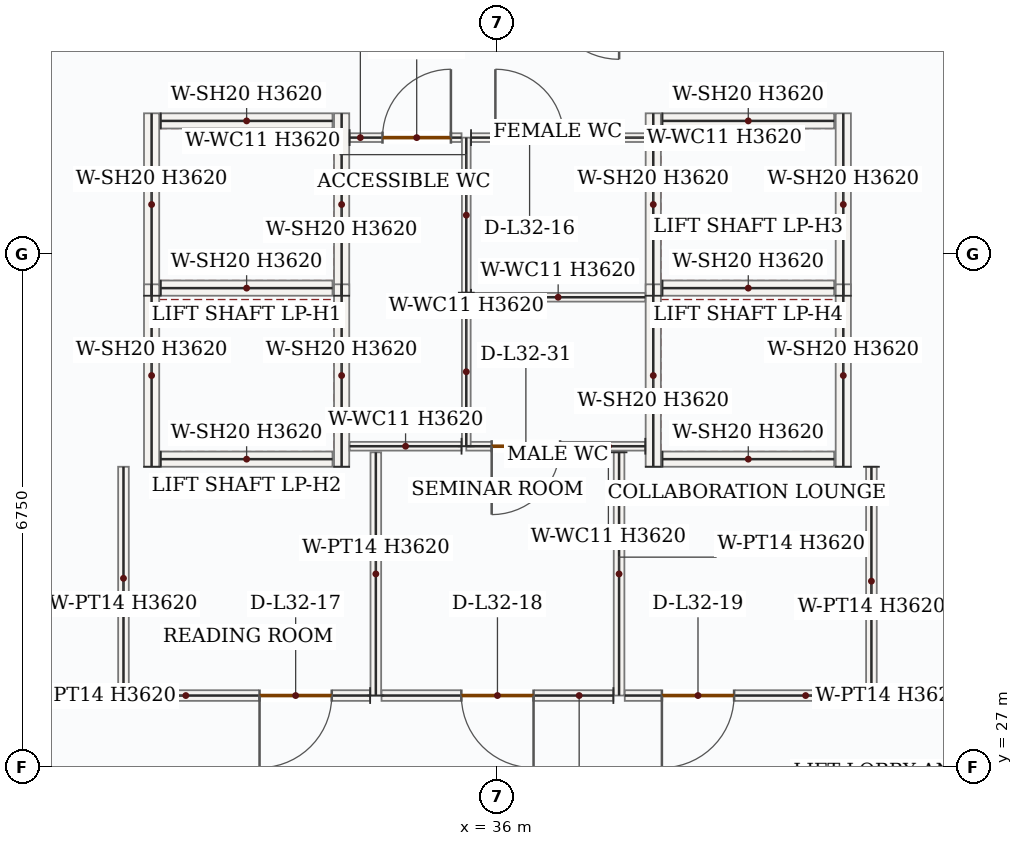
"""IFC4 building model, lengths in metres.
Left out: names, types, materials, properties, quantities, classifications, styles, units other than length and angle.
Written with IfcOpenShell. Run it as: python <this file> out.ifc"""

import sys

from ifc_helpers import new_model, si_unit, direction, frame, frame_2d, origin, place, context, subcontext, project, spatial, rectangle, extrude, source, transform, mapped, element, fill, save


model = new_model("IFC4")
c1 = context("Model", 3, precision=1e-05, world=origin(), true_north=direction((0.0, 1.0)))
c2 = subcontext(c1, "Body", "Model", "MODEL_VIEW")
j1 = project(units=[si_unit("LENGTHUNIT", "METRE"), si_unit("PLANEANGLEUNIT", "RADIAN")], contexts=[c1])
p1 = place(None, origin())
s1 = spatial("IfcSite", under=j1, at=p1, CompositionType="ELEMENT")
p2 = place(p1, origin())
s2 = spatial("IfcBuilding", under=s1, at=p2, CompositionType="ELEMENT")
p3 = place(p2, frame((0.0, 0.0, 143.4)))
s3 = spatial("IfcBuildingStorey", under=s2, at=p3, CompositionType="ELEMENT", Elevation=143.4)
m1 = source(origin(), c2, "Body", "SweptSolid", [
    extrude(rectangle(XDim=2.4, YDim=0.2, at=frame_2d((1.2, 0.0))), origin(), (0.0, 0.0, 1.0), 3.62),
])
for number, where, z_axis, x_axis in (
    (1, (31.45, 33.2, 0.0), (0.0, 0.0, 1.0), (0.0, 1.0, 0.0)),
    (2, (33.95, 33.2, 0.0), (0.0, 0.0, 1.0), (0.0, 1.0, 0.0)),
):
    element("IfcWall", number, at=place(p3, frame(where, z_axis=z_axis, x_axis=x_axis)), inside=s3, PredefinedType="SOLIDWALL", context=c2, shape_type="MappedRepresentation", body=[
        mapped(m1, transform((0.0, 0.0, 0.0), x_axis=(1.0, 0.0, 0.0), y_axis=(0.0, 1.0, 0.0), z_axis=(0.0, 0.0, 1.0), scale=1.0)),
    ])
m2 = source(origin(), c2, "Body", "SweptSolid", [
    extrude(rectangle(XDim=2.26, YDim=0.2, at=frame_2d((1.13, 0.0))), origin(), (0.0, 0.0, 1.0), 3.62),
])
for number, where, z_axis, x_axis in (
    (3, (31.57, 33.3, 0.0), (0.0, 0.0, 1.0), (1.0, 0.0, 0.0)),
    (4, (31.57, 35.5, 0.0), (0.0, 0.0, 1.0), (1.0, 0.0, 0.0)),
):
    element("IfcWall", number, at=place(p3, frame(where, z_axis=z_axis, x_axis=x_axis)), inside=s3, PredefinedType="SOLIDWALL", context=c2, shape_type="MappedRepresentation", body=[
        mapped(m2, transform((0.0, 0.0, 0.0), x_axis=(1.0, 0.0, 0.0), y_axis=(0.0, 1.0, 0.0), z_axis=(0.0, 0.0, 1.0), scale=1.0)),
    ])
for number, where, z_axis, x_axis in (
    (5, (31.45, 30.95, 0.0), (0.0, 0.0, 1.0), (0.0, 1.0, 0.0)),
    (6, (33.95, 30.95, 0.0), (0.0, 0.0, 1.0), (0.0, 1.0, 0.0)),
):
    element("IfcWall", number, at=place(p3, frame(where, z_axis=z_axis, x_axis=x_axis)), inside=s3, PredefinedType="SOLIDWALL", context=c2, shape_type="MappedRepresentation", body=[
        mapped(m1, transform((0.0, 0.0, 0.0), x_axis=(1.0, 0.0, 0.0), y_axis=(0.0, 1.0, 0.0), z_axis=(0.0, 0.0, 1.0), scale=1.0)),
    ])
p4 = place(p3, frame((31.57, 31.05, 0.0), z_axis=(0.0, 0.0, 1.0), x_axis=(1.0, 0.0, 0.0)))
e7 = element("IfcWall", 7, at=p4, inside=s3, PredefinedType="SOLIDWALL", context=c2, shape_type="MappedRepresentation", body=[
    mapped(m2, transform((0.0, 0.0, 0.0), x_axis=(1.0, 0.0, 0.0), y_axis=(0.0, 1.0, 0.0), z_axis=(0.0, 0.0, 1.0), scale=1.0)),
])
for number, where, z_axis, x_axis in (
    (8, (38.05, 33.2, 0.0), (0.0, 0.0, 1.0), (0.0, 1.0, 0.0)),
    (9, (40.55, 33.2, 0.0), (0.0, 0.0, 1.0), (0.0, 1.0, 0.0)),
):
    element("IfcWall", number, at=place(p3, frame(where, z_axis=z_axis, x_axis=x_axis)), inside=s3, PredefinedType="SOLIDWALL", context=c2, shape_type="MappedRepresentation", body=[
        mapped(m1, transform((0.0, 0.0, 0.0), x_axis=(1.0, 0.0, 0.0), y_axis=(0.0, 1.0, 0.0), z_axis=(0.0, 0.0, 1.0), scale=1.0)),
    ])
for number, where, z_axis, x_axis in (
    (10, (38.17, 33.3, 0.0), (0.0, 0.0, 1.0), (1.0, 0.0, 0.0)),
    (11, (38.17, 35.5, 0.0), (0.0, 0.0, 1.0), (1.0, 0.0, 0.0)),
):
    element("IfcWall", number, at=place(p3, frame(where, z_axis=z_axis, x_axis=x_axis)), inside=s3, PredefinedType="SOLIDWALL", context=c2, shape_type="MappedRepresentation", body=[
        mapped(m2, transform((0.0, 0.0, 0.0), x_axis=(1.0, 0.0, 0.0), y_axis=(0.0, 1.0, 0.0), z_axis=(0.0, 0.0, 1.0), scale=1.0)),
    ])
for number, where, z_axis, x_axis in (
    (12, (38.05, 30.95, 0.0), (0.0, 0.0, 1.0), (0.0, 1.0, 0.0)),
    (13, (40.55, 30.95, 0.0), (0.0, 0.0, 1.0), (0.0, 1.0, 0.0)),
):
    element("IfcWall", number, at=place(p3, frame(where, z_axis=z_axis, x_axis=x_axis)), inside=s3, PredefinedType="SOLIDWALL", context=c2, shape_type="MappedRepresentation", body=[
        mapped(m1, transform((0.0, 0.0, 0.0), x_axis=(1.0, 0.0, 0.0), y_axis=(0.0, 1.0, 0.0), z_axis=(0.0, 0.0, 1.0), scale=1.0)),
    ])
p5 = place(p3, frame((38.17, 31.05, 0.0), z_axis=(0.0, 0.0, 1.0), x_axis=(1.0, 0.0, 0.0)))
e14 = element("IfcWall", 14, at=p5, inside=s3, PredefinedType="SOLIDWALL", context=c2, shape_type="MappedRepresentation", body=[
    mapped(m2, transform((0.0, 0.0, 0.0), x_axis=(1.0, 0.0, 0.0), y_axis=(0.0, 1.0, 0.0), z_axis=(0.0, 0.0, 1.0), scale=1.0)),
])
p6 = place(p3, frame((37.945, 31.22, 0.0), z_axis=(0.0, 0.0, 1.0), x_axis=(-1.0, 0.0, 0.0)))
e15 = element("IfcWall", 15, at=p6, inside=s3, PredefinedType="PARTITIONING", context=c2, shape_type="SweptSolid", body=[
    extrude(rectangle(XDim=2.355, YDim=0.115, at=frame_2d((1.177, 0.0))), origin(), (0.0, 0.0, 1.0), 3.62),
])
p7 = place(p6, frame((1.121, 0.0, 0.0)))
e16 = element("IfcOpeningElement", 16, at=p7, cuts=e15, PredefinedType="OPENING", context=c2, shape_type="SweptSolid", body=[
    extrude(rectangle(XDim=0.9, YDim=2.1, at=frame_2d((0.45, 1.05))), frame((0.0, 0.067, 0.0), z_axis=(0.0, -1.0, 0.0), x_axis=(1.0, 0.0, 0.0)), (0.0, 0.0, 1.0), 0.135),
])
m3 = source(origin(), c2, "Body", "SweptSolid", [
    extrude(rectangle(XDim=1.96, YDim=0.115, at=frame_2d((0.98, 0.0))), origin(), (0.0, 0.0, 1.0), 3.62),
])
p8 = place(p3, frame((35.59, 31.22, 0.0), z_axis=(0.0, 0.0, 1.0), x_axis=(0.0, 1.0, 0.0)))
e17 = element("IfcWall", 17, at=p8, inside=s3, PredefinedType="PARTITIONING", context=c2, shape_type="MappedRepresentation", body=[
    mapped(m3, transform((0.0, 0.0, 0.0), x_axis=(1.0, 0.0, 0.0), y_axis=(0.0, 1.0, 0.0), z_axis=(0.0, 0.0, 1.0), scale=1.0)),
])
m4 = source(origin(), c2, "Body", "SweptSolid", [
    extrude(rectangle(XDim=2.292, YDim=0.115, at=frame_2d((1.146, 0.0))), origin(), (0.0, 0.0, 1.0), 3.62),
])
p9 = place(p3, frame((35.653, 33.18, 0.0), z_axis=(0.0, 0.0, 1.0), x_axis=(1.0, 0.0, 0.0)))
e18 = element("IfcWall", 18, at=p9, inside=s3, PredefinedType="PARTITIONING", context=c2, shape_type="MappedRepresentation", body=[
    mapped(m4, transform((0.0, 0.0, 0.0), x_axis=(1.0, 0.0, 0.0), y_axis=(0.0, 1.0, 0.0), z_axis=(0.0, 0.0, 1.0), scale=1.0)),
])
m5 = source(origin(), c2, "Body", "SweptSolid", [
    extrude(rectangle(XDim=2.04, YDim=0.115, at=frame_2d((1.02, 0.0))), origin(), (0.0, 0.0, 1.0), 3.62),
])
p10 = place(p3, frame((35.59, 33.24, 0.0), z_axis=(0.0, 0.0, 1.0), x_axis=(0.0, 1.0, 0.0)))
e19 = element("IfcWall", 19, at=p10, inside=s3, PredefinedType="PARTITIONING", context=c2, shape_type="MappedRepresentation", body=[
    mapped(m5, transform((0.0, 0.0, 0.0), x_axis=(1.0, 0.0, 0.0), y_axis=(0.0, 1.0, 0.0), z_axis=(0.0, 0.0, 1.0), scale=1.0)),
])
p11 = place(p3, frame((35.653, 35.28, 0.0), z_axis=(0.0, 0.0, 1.0), x_axis=(1.0, 0.0, 0.0)))
e20 = element("IfcWall", 20, at=p11, inside=s3, PredefinedType="PARTITIONING", context=c2, shape_type="SweptSolid", body=[
    extrude(rectangle(XDim=2.292, YDim=0.115, at=frame_2d((1.146, 0.0))), origin(), (0.0, 0.0, 1.0), 3.62),
])
p12 = place(p11, frame((0.32, 0.0, 0.0)))
e21 = element("IfcOpeningElement", 21, at=p12, cuts=e20, PredefinedType="OPENING", context=c2, shape_type="SweptSolid", body=[
    extrude(rectangle(XDim=0.9, YDim=2.1, at=frame_2d((0.45, 1.05))), frame((0.0, 0.067, 0.0), z_axis=(0.0, -1.0, 0.0), x_axis=(1.0, 0.0, 0.0)), (0.0, 0.0, 1.0), 0.135),
])
m6 = source(origin(), c2, "Body", "SweptSolid", [
    extrude(rectangle(XDim=1.473, YDim=0.115, at=frame_2d((0.736, 0.0))), origin(), (0.0, 0.0, 1.0), 3.62),
])
p13 = place(p3, frame((35.528, 31.22, 0.0), z_axis=(0.0, 0.0, 1.0), x_axis=(-1.0, 0.0, 0.0)))
e22 = element("IfcWall", 22, at=p13, inside=s3, PredefinedType="PARTITIONING", context=c2, shape_type="MappedRepresentation", body=[
    mapped(m6, transform((0.0, 0.0, 0.0), x_axis=(1.0, 0.0, 0.0), y_axis=(0.0, 1.0, 0.0), z_axis=(0.0, 0.0, 1.0), scale=1.0)),
])
p14 = place(p3, frame((34.055, 35.28, 0.0), z_axis=(0.0, 0.0, 1.0), x_axis=(1.0, 0.0, 0.0)))
e23 = element("IfcWall", 23, at=p14, inside=s3, PredefinedType="PARTITIONING", context=c2, shape_type="SweptSolid", body=[
    extrude(rectangle(XDim=1.473, YDim=0.115, at=frame_2d((0.736, 0.0))), origin(), (0.0, 0.0, 1.0), 3.62),
])
p15 = place(p14, frame((0.433, 0.0, 0.0)))
e24 = element("IfcOpeningElement", 24, at=p15, cuts=e23, PredefinedType="OPENING", context=c2, shape_type="SweptSolid", body=[
    extrude(rectangle(XDim=0.9, YDim=2.1, at=frame_2d((0.45, 1.05))), frame((0.0, 0.067, 0.0), z_axis=(0.0, -1.0, 0.0), x_axis=(1.0, 0.0, 0.0)), (0.0, 0.0, 1.0), 0.135),
])
m7 = source(origin(), c2, "Body", "SweptSolid", [
    extrude(rectangle(XDim=3.2, YDim=0.14, at=frame_2d((1.6, 0.0))), origin(), (0.0, 0.0, 1.0), 3.62),
])
for number, where, z_axis, x_axis in (
    (25, (34.4, 27.94, 0.0), (0.0, 0.0, 1.0), (0.0, 1.0, 0.0)),
    (26, (37.6, 31.14, 0.0), (0.0, 0.0, 1.0), (0.0, -1.0, 0.0)),
):
    element("IfcWall", number, at=place(p3, frame(where, z_axis=z_axis, x_axis=x_axis)), inside=s3, PredefinedType="PARTITIONING", context=c2, shape_type="MappedRepresentation", body=[
        mapped(m7, transform((0.0, 0.0, 0.0), x_axis=(1.0, 0.0, 0.0), y_axis=(0.0, 1.0, 0.0), z_axis=(0.0, 0.0, 1.0), scale=1.0)),
    ])
p16 = place(p3, frame((37.525, 27.94, 0.0), z_axis=(0.0, 0.0, 1.0), x_axis=(-1.0, 0.0, 0.0)))
e27 = element("IfcWall", 27, at=p16, inside=s3, PredefinedType="PARTITIONING", context=c2, shape_type="SweptSolid", body=[
    extrude(rectangle(XDim=3.05, YDim=0.14, at=frame_2d((1.525, 0.0))), origin(), (0.0, 0.0, 1.0), 3.62),
])
p17 = place(p16, frame((1.05, 0.0, 0.0)))
e28 = element("IfcOpeningElement", 28, at=p17, cuts=e27, PredefinedType="OPENING", context=c2, shape_type="SweptSolid", body=[
    extrude(rectangle(XDim=0.95, YDim=2.15, at=frame_2d((0.475, 1.075))), frame((0.0, 0.08, 0.0), z_axis=(0.0, -1.0, 0.0), x_axis=(1.0, 0.0, 0.0)), (0.0, 0.0, 1.0), 0.16),
])
p18 = place(p3, frame((34.325, 27.94, 0.0), z_axis=(0.0, 0.0, 1.0), x_axis=(-1.0, 0.0, 0.0)))
e29 = element("IfcWall", 29, at=p18, inside=s3, PredefinedType="PARTITIONING", context=c2, shape_type="SweptSolid", body=[
    extrude(rectangle(XDim=3.245, YDim=0.14, at=frame_2d((1.623, 0.0))), origin(), (0.0, 0.0, 1.0), 3.62),
])
p19 = place(p18, frame((0.505, 0.0, 0.0)))
e30 = element("IfcOpeningElement", 30, at=p19, cuts=e29, PredefinedType="OPENING", context=c2, shape_type="SweptSolid", body=[
    extrude(rectangle(XDim=0.95, YDim=2.15, at=frame_2d((0.475, 1.075))), frame((0.0, 0.08, 0.0), z_axis=(0.0, -1.0, 0.0), x_axis=(1.0, 0.0, 0.0)), (0.0, 0.0, 1.0), 0.16),
])
m8 = source(origin(), c2, "Body", "SweptSolid", [
    extrude(rectangle(XDim=2.935, YDim=0.14, at=frame_2d((1.468, 0.0))), origin(), (0.0, 0.0, 1.0), 3.62),
])
p20 = place(p3, frame((31.08, 28.015, 0.0), z_axis=(0.0, 0.0, 1.0), x_axis=(0.0, 1.0, 0.0)))
e31 = element("IfcWall", 31, at=p20, inside=s3, PredefinedType="PARTITIONING", context=c2, shape_type="MappedRepresentation", body=[
    mapped(m8, transform((0.0, 0.0, 0.0), x_axis=(1.0, 0.0, 0.0), y_axis=(0.0, 1.0, 0.0), z_axis=(0.0, 0.0, 1.0), scale=1.0)),
])
m9 = source(origin(), c2, "Body", "SweptSolid", [
    extrude(rectangle(XDim=3.01, YDim=0.14, at=frame_2d((1.505, 0.0))), origin(), (0.0, 0.0, 1.0), 3.62),
])
p21 = place(p3, frame((40.92, 30.95, 0.0), z_axis=(0.0, 0.0, 1.0), x_axis=(0.0, -1.0, 0.0)))
e32 = element("IfcWall", 32, at=p21, inside=s3, PredefinedType="PARTITIONING", context=c2, shape_type="MappedRepresentation", body=[
    mapped(m9, transform((0.0, 0.0, 0.0), x_axis=(1.0, 0.0, 0.0), y_axis=(0.0, 1.0, 0.0), z_axis=(0.0, 0.0, 1.0), scale=1.0)),
])
p22 = place(p3, frame((40.845, 27.94, 0.0), z_axis=(0.0, 0.0, 1.0), x_axis=(-1.0, 0.0, 0.0)))
e33 = element("IfcWall", 33, at=p22, inside=s3, PredefinedType="PARTITIONING", context=c2, shape_type="SweptSolid", body=[
    extrude(rectangle(XDim=3.17, YDim=0.14, at=frame_2d((1.585, 0.0))), origin(), (0.0, 0.0, 1.0), 3.62),
])
p23 = place(p22, frame((1.732, 0.0, 0.0)))
e34 = element("IfcOpeningElement", 34, at=p23, cuts=e33, PredefinedType="OPENING", context=c2, shape_type="SweptSolid", body=[
    extrude(rectangle(XDim=0.95, YDim=2.15, at=frame_2d((0.475, 1.075))), frame((0.0, 0.08, 0.0), z_axis=(0.0, -1.0, 0.0), x_axis=(1.0, 0.0, 0.0)), (0.0, 0.0, 1.0), 0.16),
])
m10 = source(origin(), c2, "Body", "SweptSolid", [
    extrude(rectangle(XDim=0.9, YDim=2.1, at=frame_2d((0.45, 1.05))), frame((0.0, 0.025, 0.0), z_axis=(0.0, -1.0, 0.0), x_axis=(1.0, 0.0, 0.0)), (0.0, 0.0, 1.0), 0.05),
])
p24 = place(p15, origin())
e35 = element("IfcDoor", 35, at=p24, inside=s3, OperationType="SINGLE_SWING_RIGHT", PredefinedType="DOOR", context=c2, shape_type="MappedRepresentation", body=[
    mapped(m10, transform((0.0, 0.0, 0.0), x_axis=(1.0, 0.0, 0.0), y_axis=(0.0, 1.0, 0.0), z_axis=(0.0, 0.0, 1.0), scale=1.0)),
])
fill(e24, e35)
p25 = place(p12, origin())
e36 = element("IfcDoor", 36, at=p25, inside=s3, OperationType="SINGLE_SWING_LEFT", PredefinedType="DOOR", context=c2, shape_type="MappedRepresentation", body=[
    mapped(m10, transform((0.0, 0.0, 0.0), x_axis=(1.0, 0.0, 0.0), y_axis=(0.0, 1.0, 0.0), z_axis=(0.0, 0.0, 1.0), scale=1.0)),
])
fill(e21, e36)
m11 = source(origin(), c2, "Body", "SweptSolid", [
    extrude(rectangle(XDim=0.95, YDim=2.15, at=frame_2d((0.475, 1.075))), frame((0.0, 0.025, 0.0), z_axis=(0.0, -1.0, 0.0), x_axis=(1.0, 0.0, 0.0)), (0.0, 0.0, 1.0), 0.05),
])
p26 = place(p19, origin())
e37 = element("IfcDoor", 37, at=p26, inside=s3, OperationType="SINGLE_SWING_RIGHT", PredefinedType="DOOR", context=c2, shape_type="MappedRepresentation", body=[
    mapped(m11, transform((0.0, 0.0, 0.0), x_axis=(1.0, 0.0, 0.0), y_axis=(0.0, 1.0, 0.0), z_axis=(0.0, 0.0, 1.0), scale=1.0)),
])
fill(e30, e37)
p27 = place(p17, origin())
e38 = element("IfcDoor", 38, at=p27, inside=s3, OperationType="SINGLE_SWING_LEFT", PredefinedType="DOOR", context=c2, shape_type="MappedRepresentation", body=[
    mapped(m11, transform((0.0, 0.0, 0.0), x_axis=(1.0, 0.0, 0.0), y_axis=(0.0, 1.0, 0.0), z_axis=(0.0, 0.0, 1.0), scale=1.0)),
])
fill(e28, e38)
p28 = place(p23, origin())
e39 = element("IfcDoor", 39, at=p28, inside=s3, OperationType="SINGLE_SWING_RIGHT", PredefinedType="DOOR", context=c2, shape_type="MappedRepresentation", body=[
    mapped(m11, transform((0.0, 0.0, 0.0), x_axis=(1.0, 0.0, 0.0), y_axis=(0.0, 1.0, 0.0), z_axis=(0.0, 0.0, 1.0), scale=1.0)),
])
fill(e34, e39)
p29 = place(p7, origin())
e40 = element("IfcDoor", 40, at=p29, inside=s3, OperationType="SINGLE_SWING_RIGHT", PredefinedType="DOOR", context=c2, shape_type="MappedRepresentation", body=[
    mapped(m10, transform((0.0, 0.0, 0.0), x_axis=(1.0, 0.0, 0.0), y_axis=(0.0, 1.0, 0.0), z_axis=(0.0, 0.0, 1.0), scale=1.0)),
])
fill(e16, e40)
save(model, sys.argv[1])
